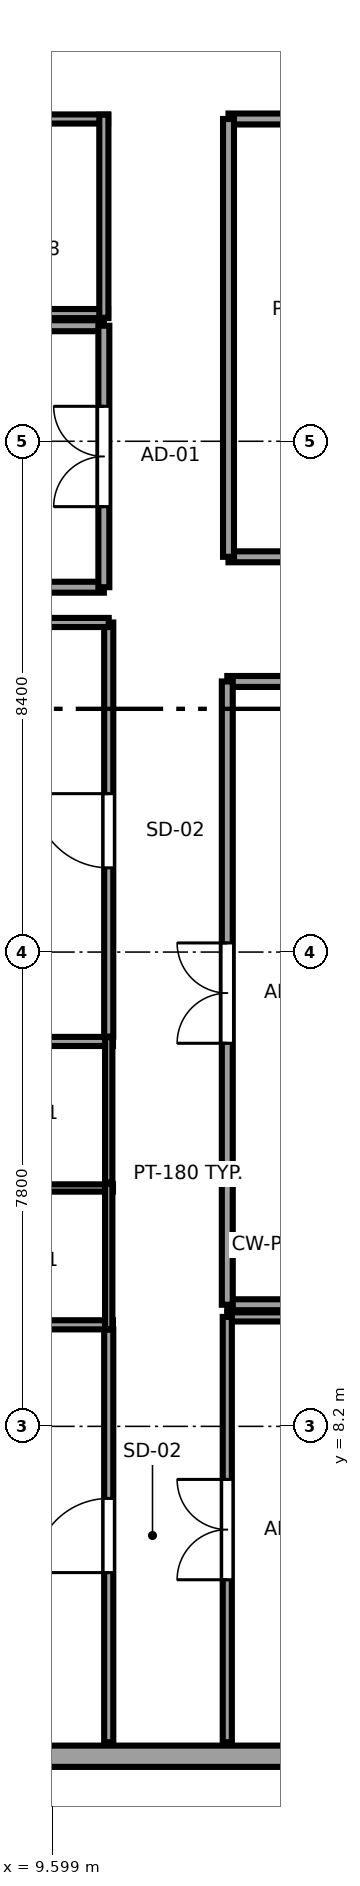
"""IFC4 building model, lengths in metres.
Left out: names, types, materials, properties, quantities, classifications, styles, units other than length and angle.
Written with IfcOpenShell. Run it as: python <this file> out.ifc"""

import sys

from ifc_helpers import new_model, si_unit, direction, frame, frame_2d, origin, place, context, subcontext, project, spatial, rectangle, extrude, source, transform, mapped, element, fill, save


model = new_model("IFC4")
c1 = context("Model", 3, precision=1e-05, world=origin(), true_north=direction((0.0, 1.0)))
c2 = subcontext(c1, "Body", "Model", "MODEL_VIEW")
j1 = project(units=[si_unit("LENGTHUNIT", "METRE"), si_unit("PLANEANGLEUNIT", "RADIAN")], contexts=[c1])
p1 = place(None, origin())
s1 = spatial("IfcSite", under=j1, at=p1, CompositionType="ELEMENT")
p2 = place(p1, origin())
s2 = spatial("IfcBuilding", under=s1, at=p2, CompositionType="ELEMENT")
p3 = place(p2, frame((0.0, 0.0, 255.85)))
s3 = spatial("IfcBuildingStorey", under=s2, at=p3, CompositionType="ELEMENT", Elevation=255.85)
p4 = place(p3, frame((7.017, 2.775, 0.0), z_axis=(0.0, 0.0, 1.0), x_axis=(1.0, 0.0, 0.0)))
e1 = element("IfcWall", 1, at=p4, inside=s3, PredefinedType="SOLIDWALL", context=c2, shape_type="SweptSolid", body=[
    extrude(rectangle(XDim=8.008, YDim=0.35, at=frame_2d((4.004, 0.0))), origin(), (0.0, 0.0, 1.0), 3.37),
])
p5 = place(p3, frame((8.01, 9.87, 0.0), z_axis=(0.0, 0.0, 1.0), x_axis=(1.0, 0.0, 0.0)))
e2 = element("IfcWall", 2, at=p5, inside=s3, PredefinedType="PARTITIONING", context=c2, shape_type="SweptSolid", body=[
    extrude(rectangle(XDim=2.59, YDim=0.15, at=frame_2d((1.295, 0.0))), origin(), (0.0, 0.0, 1.0), 3.37),
])
p6 = place(p3, frame((8.01, 12.12, 0.0), z_axis=(0.0, 0.0, 1.0), x_axis=(1.0, 0.0, 0.0)))
e3 = element("IfcWall", 3, at=p6, inside=s3, PredefinedType="PLUMBINGWALL", context=c2, shape_type="SweptSolid", body=[
    extrude(rectangle(XDim=2.59, YDim=0.12, at=frame_2d((1.295, 0.0))), origin(), (0.0, 0.0, 1.0), 3.37),
])
p7 = place(p3, frame((10.53, 9.8, 0.0), z_axis=(0.0, 0.0, 1.0), x_axis=(0.0, 1.0, 0.0)))
e4 = element("IfcWall", 4, at=p7, inside=s3, PredefinedType="PLUMBINGWALL", context=c2, shape_type="SweptSolid", body=[
    extrude(rectangle(XDim=2.39, YDim=0.12, at=frame_2d((1.195, 0.0))), origin(), (0.0, 0.0, 1.0), 3.37),
])
p8 = place(p3, frame((8.01, 14.53, 0.0), z_axis=(0.0, 0.0, 1.0), x_axis=(1.0, 0.0, 0.0)))
e5 = element("IfcWall", 5, at=p8, inside=s3, PredefinedType="PARTITIONING", context=c2, shape_type="SweptSolid", body=[
    extrude(rectangle(XDim=2.59, YDim=0.15, at=frame_2d((1.295, 0.0))), origin(), (0.0, 0.0, 1.0), 3.37),
])
p9 = place(p3, frame((10.53, 12.21, 0.0), z_axis=(0.0, 0.0, 1.0), x_axis=(0.0, 1.0, 0.0)))
e6 = element("IfcWall", 6, at=p9, inside=s3, PredefinedType="PLUMBINGWALL", context=c2, shape_type="SweptSolid", body=[
    extrude(rectangle(XDim=2.39, YDim=0.12, at=frame_2d((1.195, 0.0))), origin(), (0.0, 0.0, 1.0), 3.37),
])
p10 = place(p3, frame((10.53, 3.005, 0.0), z_axis=(0.0, 0.0, 1.0), x_axis=(0.0, 1.0, 0.0)))
e7 = element("IfcWall", 7, at=p10, inside=s3, PredefinedType="PARTITIONING", context=c2, shape_type="SweptSolid", body=[
    extrude(rectangle(XDim=6.785, YDim=0.15, at=frame_2d((3.393, 0.0))), origin(), (0.0, 0.0, 1.0), 3.37),
])
p11 = place(p10, frame((2.79, 0.0, 0.0)))
e8 = element("IfcOpeningElement", 8, at=p11, cuts=e7, PredefinedType="OPENING", context=c2, shape_type="SweptSolid", body=[
    extrude(rectangle(XDim=1.22, YDim=2.08, at=frame_2d((0.61, 1.04))), frame((0.0, 0.085, 0.0), z_axis=(0.0, -1.0, 0.0), x_axis=(1.0, 0.0, 0.0)), (0.0, 0.0, 1.0), 0.17),
])
p12 = place(p3, frame((10.53, 14.61, 0.0), z_axis=(0.0, 0.0, 1.0), x_axis=(0.0, 1.0, 0.0)))
e9 = element("IfcWall", 9, at=p12, inside=s3, PredefinedType="PARTITIONING", context=c2, shape_type="SweptSolid", body=[
    extrude(rectangle(XDim=6.81, YDim=0.15, at=frame_2d((3.405, 0.0))), origin(), (0.0, 0.0, 1.0), 3.37),
])
p13 = place(p12, frame((2.775, 0.0, 0.0)))
e10 = element("IfcOpeningElement", 10, at=p13, cuts=e9, PredefinedType="OPENING", context=c2, shape_type="SweptSolid", body=[
    extrude(rectangle(XDim=1.22, YDim=2.08, at=frame_2d((0.61, 1.04))), frame((0.0, 0.085, 0.0), z_axis=(0.0, -1.0, 0.0), x_axis=(1.0, 0.0, 0.0)), (0.0, 0.0, 1.0), 0.17),
])
p14 = place(p3, frame((3.005, 21.42, 0.0), z_axis=(0.0, 0.0, 1.0), x_axis=(1.0, 0.0, 0.0)))
e11 = element("IfcWall", 11, at=p14, inside=s3, PredefinedType="PARTITIONING", context=c2, shape_type="SweptSolid", body=[
    extrude(rectangle(XDim=7.525, YDim=0.15, at=frame_2d((3.763, 0.0))), origin(), (0.0, 0.0, 1.0), 3.37),
])
for number, where, z_axis, x_axis in (
    (12, (12.48, 10.2, 0.0), (0.0, 0.0, 1.0), (1.0, 0.0, 0.0)),
    (13, (12.48, 20.45, 0.0), (0.0, 0.0, 1.0), (1.0, 0.0, 0.0)),
):
    element("IfcWall", number, at=place(p3, frame(where, z_axis=z_axis, x_axis=x_axis)), inside=s3, PredefinedType="PARTITIONING", context=c2, shape_type="SweptSolid", body=[
        extrude(rectangle(XDim=2.37, YDim=0.18, at=frame_2d((1.185, 0.0))), origin(), (0.0, 0.0, 1.0), 3.37),
    ])
p15 = place(p3, frame((12.48, 10.2, 0.0), z_axis=(0.0, 0.0, 1.0), x_axis=(0.0, 1.0, 0.0)))
e14 = element("IfcWall", 14, at=p15, inside=s3, PredefinedType="PARTITIONING", context=c2, shape_type="SweptSolid", body=[
    extrude(rectangle(XDim=10.25, YDim=0.18, at=frame_2d((5.125, 0.0))), origin(), (0.0, 0.0, 1.0), 3.37),
])
p16 = place(p15, frame((4.3, 0.0, 0.0)))
e15 = element("IfcOpeningElement", 15, at=p16, cuts=e14, PredefinedType="OPENING", context=c2, shape_type="SweptSolid", body=[
    extrude(rectangle(XDim=1.65, YDim=2.15, at=frame_2d((0.825, 1.075))), frame((0.0, 0.1, 0.0), z_axis=(0.0, -1.0, 0.0), x_axis=(1.0, 0.0, 0.0)), (0.0, 0.0, 1.0), 0.2),
])
p17 = place(p3, frame((12.48, 10.0, 0.0), z_axis=(0.0, 0.0, 1.0), x_axis=(1.0, 0.0, 0.0)))
e16 = element("IfcWall", 16, at=p17, inside=s3, PredefinedType="PARTITIONING", context=c2, shape_type="SweptSolid", body=[
    extrude(rectangle(XDim=2.37, YDim=0.15, at=frame_2d((1.185, 0.0))), origin(), (0.0, 0.0, 1.0), 3.37),
])
p18 = place(p3, frame((12.48, 3.005, 0.0), z_axis=(0.0, 0.0, 1.0), x_axis=(0.0, 1.0, 0.0)))
e17 = element("IfcWall", 17, at=p18, inside=s3, PredefinedType="PARTITIONING", context=c2, shape_type="SweptSolid", body=[
    extrude(rectangle(XDim=6.995, YDim=0.15, at=frame_2d((3.498, 0.0))), origin(), (0.0, 0.0, 1.0), 3.37),
])
p19 = place(p18, frame((2.673, 0.0, 0.0)))
e18 = element("IfcOpeningElement", 18, at=p19, cuts=e17, PredefinedType="OPENING", context=c2, shape_type="SweptSolid", body=[
    extrude(rectangle(XDim=1.65, YDim=2.15, at=frame_2d((0.825, 1.075))), frame((0.0, 0.085, 0.0), z_axis=(0.0, -1.0, 0.0), x_axis=(1.0, 0.0, 0.0)), (0.0, 0.0, 1.0), 0.17),
])
p20 = place(p3, frame((12.5, 22.5, 0.0), z_axis=(0.0, 0.0, 1.0), x_axis=(1.0, 0.0, 0.0)))
e19 = element("IfcWall", 19, at=p20, inside=s3, PredefinedType="PARTITIONING", context=c2, shape_type="SweptSolid", body=[
    extrude(rectangle(XDim=6.1, YDim=0.18, at=frame_2d((3.05, 0.0))), origin(), (0.0, 0.0, 1.0), 3.37),
])
p21 = place(p20, frame((2.225, 0.0, 0.0)))
e20 = element("IfcOpeningElement", 20, at=p21, cuts=e19, PredefinedType="OPENING", context=c2, shape_type="SweptSolid", body=[
    extrude(rectangle(XDim=1.65, YDim=2.15, at=frame_2d((0.825, 1.075))), frame((0.0, 0.1, 0.0), z_axis=(0.0, -1.0, 0.0), x_axis=(1.0, 0.0, 0.0)), (0.0, 0.0, 1.0), 0.2),
])
p22 = place(p3, frame((12.5, 29.7, 0.0), z_axis=(0.0, 0.0, 1.0), x_axis=(1.0, 0.0, 0.0)))
e21 = element("IfcWall", 21, at=p22, inside=s3, PredefinedType="PARTITIONING", context=c2, shape_type="SweptSolid", body=[
    extrude(rectangle(XDim=6.1, YDim=0.18, at=frame_2d((3.05, 0.0))), origin(), (0.0, 0.0, 1.0), 3.37),
])
p23 = place(p3, frame((12.5, 22.5, 0.0), z_axis=(0.0, 0.0, 1.0), x_axis=(0.0, 1.0, 0.0)))
e22 = element("IfcWall", 22, at=p23, inside=s3, PredefinedType="PARTITIONING", context=c2, shape_type="SweptSolid", body=[
    extrude(rectangle(XDim=7.2, YDim=0.18, at=frame_2d((3.6, 0.0))), origin(), (0.0, 0.0, 1.0), 3.37),
])
for number, where, z_axis, x_axis in (
    (23, (3.005, 22.0, 0.0), (0.0, 0.0, 1.0), (1.0, 0.0, 0.0)),
    (24, (3.005, 26.3, 0.0), (0.0, 0.0, 1.0), (1.0, 0.0, 0.0)),
):
    element("IfcWall", number, at=place(p3, frame(where, z_axis=z_axis, x_axis=x_axis)), inside=s3, PredefinedType="PARTITIONING", context=c2, shape_type="SweptSolid", body=[
        extrude(rectangle(XDim=7.445, YDim=0.18, at=frame_2d((3.723, 0.0))), origin(), (0.0, 0.0, 1.0), 3.37),
    ])
p24 = place(p3, frame((10.45, 22.0, 0.0), z_axis=(0.0, 0.0, 1.0), x_axis=(0.0, 1.0, 0.0)))
e25 = element("IfcWall", 25, at=p24, inside=s3, PredefinedType="PARTITIONING", context=c2, shape_type="SweptSolid", body=[
    extrude(rectangle(XDim=4.3, YDim=0.18, at=frame_2d((2.15, 0.0))), origin(), (0.0, 0.0, 1.0), 3.37),
])
p25 = place(p24, frame((1.325, 0.0, 0.0)))
e26 = element("IfcOpeningElement", 26, at=p25, cuts=e25, PredefinedType="OPENING", context=c2, shape_type="SweptSolid", body=[
    extrude(rectangle(XDim=1.65, YDim=2.15, at=frame_2d((0.825, 1.075))), frame((0.0, 0.1, 0.0), z_axis=(0.0, -1.0, 0.0), x_axis=(1.0, 0.0, 0.0)), (0.0, 0.0, 1.0), 0.2),
])
p26 = place(p3, frame((6.13, 26.5, 0.0), z_axis=(0.0, 0.0, 1.0), x_axis=(1.0, 0.0, 0.0)))
e27 = element("IfcWall", 27, at=p26, inside=s3, PredefinedType="PARTITIONING", context=c2, shape_type="SweptSolid", body=[
    extrude(rectangle(XDim=4.39, YDim=0.15, at=frame_2d((2.195, 0.0))), origin(), (0.0, 0.0, 1.0), 3.37),
])
p27 = place(p3, frame((6.13, 29.7, 0.0), z_axis=(0.0, 0.0, 1.0), x_axis=(1.0, 0.0, 0.0)))
e28 = element("IfcWall", 28, at=p27, inside=s3, PredefinedType="PARTITIONING", context=c2, shape_type="SweptSolid", body=[
    extrude(rectangle(XDim=4.39, YDim=0.15, at=frame_2d((2.195, 0.0))), origin(), (0.0, 0.0, 1.0), 3.37),
])
p28 = place(p27, frame((1.735, 0.0, 0.0)))
e29 = element("IfcOpeningElement", 29, at=p28, cuts=e28, PredefinedType="OPENING", context=c2, shape_type="SweptSolid", body=[
    extrude(rectangle(XDim=0.92, YDim=2.01, at=frame_2d((0.46, 1.005))), frame((0.0, 0.085, 0.0), z_axis=(0.0, -1.0, 0.0), x_axis=(1.0, 0.0, 0.0)), (0.0, 0.0, 1.0), 0.17),
])
p29 = place(p3, frame((10.45, 26.43, 0.0), z_axis=(0.0, 0.0, 1.0), x_axis=(0.0, 1.0, 0.0)))
e30 = element("IfcWall", 30, at=p29, inside=s3, PredefinedType="PARTITIONING", context=c2, shape_type="SweptSolid", body=[
    extrude(rectangle(XDim=3.34, YDim=0.15, at=frame_2d((1.67, 0.0))), origin(), (0.0, 0.0, 1.0), 3.37),
])
m1 = source(origin(), c2, "Body", "SweptSolid", [
    extrude(rectangle(XDim=1.22, YDim=2.08, at=frame_2d((0.61, 1.04))), frame((0.0, 0.025, 0.0), z_axis=(0.0, -1.0, 0.0), x_axis=(1.0, 0.0, 0.0)), (0.0, 0.0, 1.0), 0.05),
])
p30 = place(p11, origin())
e31 = element("IfcDoor", 31, at=p30, inside=s3, OperationType="SINGLE_SWING_LEFT", PredefinedType="DOOR", context=c2, shape_type="MappedRepresentation", body=[
    mapped(m1, transform((0.0, 0.0, 0.0), x_axis=(1.0, 0.0, 0.0), y_axis=(0.0, 1.0, 0.0), z_axis=(0.0, 0.0, 1.0), scale=1.0)),
])
fill(e8, e31)
p31 = place(p13, origin())
e32 = element("IfcDoor", 32, at=p31, inside=s3, OperationType="SINGLE_SWING_RIGHT", PredefinedType="DOOR", context=c2, shape_type="MappedRepresentation", body=[
    mapped(m1, transform((0.0, 0.0, 0.0), x_axis=(1.0, 0.0, 0.0), y_axis=(0.0, 1.0, 0.0), z_axis=(0.0, 0.0, 1.0), scale=1.0)),
])
fill(e10, e32)
m2 = source(origin(), c2, "Body", "SweptSolid", [
    extrude(rectangle(XDim=1.65, YDim=2.15, at=frame_2d((0.825, 1.075))), frame((0.0, 0.025, 0.0), z_axis=(0.0, -1.0, 0.0), x_axis=(1.0, 0.0, 0.0)), (0.0, 0.0, 1.0), 0.05),
])
p32 = place(p16, origin())
e33 = element("IfcDoor", 33, at=p32, inside=s3, OperationType="DOUBLE_DOOR_SINGLE_SWING", PredefinedType="DOOR", context=c2, shape_type="MappedRepresentation", body=[
    mapped(m2, transform((0.0, 0.0, 0.0), x_axis=(1.0, 0.0, 0.0), y_axis=(0.0, 1.0, 0.0), z_axis=(0.0, 0.0, 1.0), scale=1.0)),
])
fill(e15, e33)
p33 = place(p19, origin())
e34 = element("IfcDoor", 34, at=p33, inside=s3, OperationType="DOUBLE_DOOR_SINGLE_SWING", PredefinedType="DOOR", context=c2, shape_type="MappedRepresentation", body=[
    mapped(m2, transform((0.0, 0.0, 0.0), x_axis=(1.0, 0.0, 0.0), y_axis=(0.0, 1.0, 0.0), z_axis=(0.0, 0.0, 1.0), scale=1.0)),
])
fill(e18, e34)
p34 = place(p25, origin())
e35 = element("IfcDoor", 35, at=p34, inside=s3, OperationType="DOUBLE_DOOR_SINGLE_SWING", PredefinedType="DOOR", context=c2, shape_type="MappedRepresentation", body=[
    mapped(m2, transform((0.0, 0.0, 0.0), x_axis=(1.0, 0.0, 0.0), y_axis=(0.0, 1.0, 0.0), z_axis=(0.0, 0.0, 1.0), scale=1.0)),
])
fill(e26, e35)
save(model, sys.argv[1])
